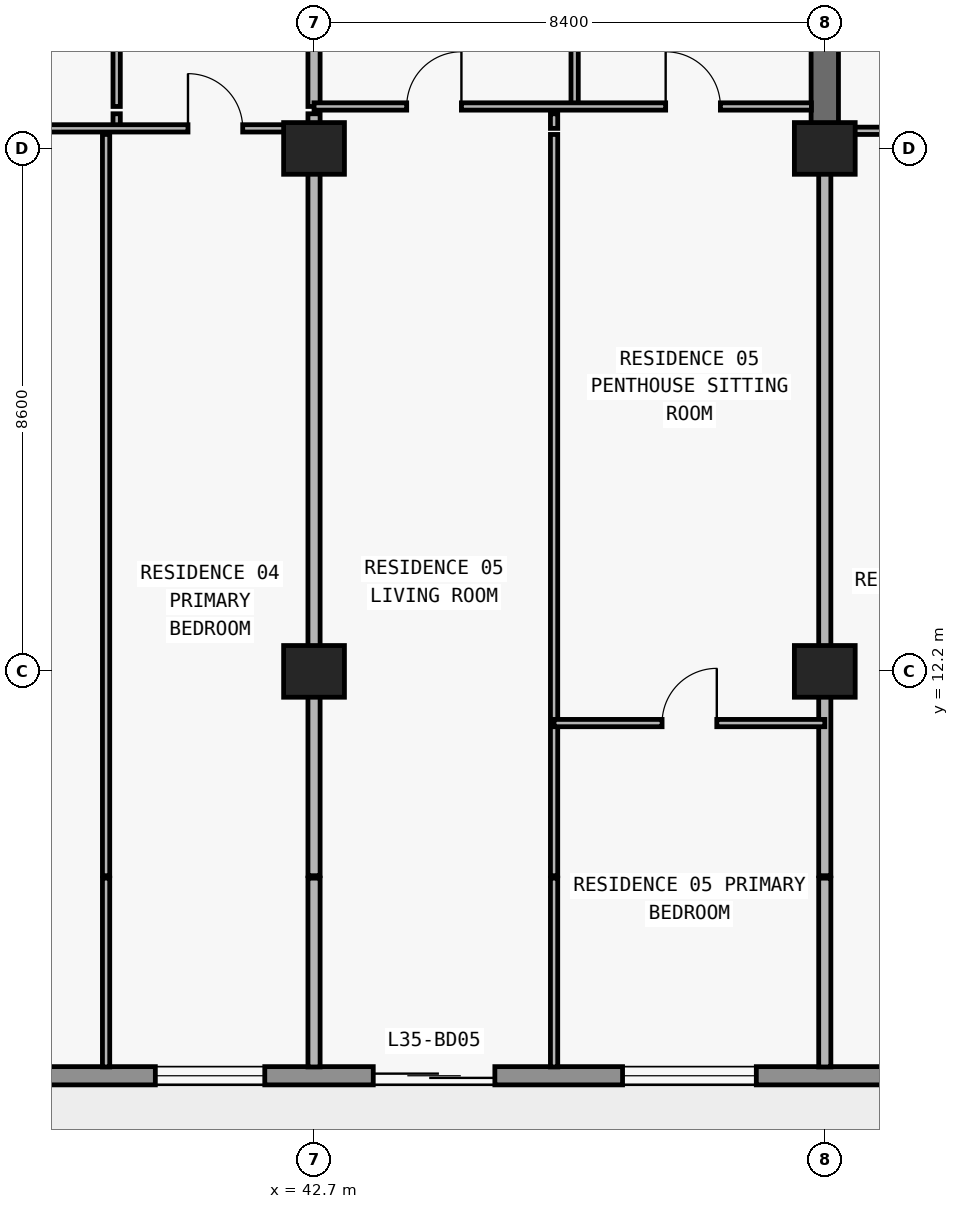
"""IFC4 building model, lengths in metres.
Left out: names, types, materials, properties, quantities, classifications, styles, units other than length and angle.
Written with IfcOpenShell. Run it as: python <this file> out.ifc"""

import sys

from ifc_helpers import new_model, si_unit, direction, frame, frame_2d, origin, origin_2d, place, context, subcontext, project, spatial, rectangle, extrude, element, fill, save


model = new_model("IFC4")
c1 = context("Model", 3, precision=1e-05, world=origin(), true_north=direction((0.0, 1.0)))
c2 = subcontext(c1, "Body", "Model", "MODEL_VIEW")
j1 = project(units=[si_unit("LENGTHUNIT", "METRE"), si_unit("PLANEANGLEUNIT", "RADIAN")], contexts=[c1])
p1 = place(None, origin())
s1 = spatial("IfcSite", under=j1, at=p1, CompositionType="ELEMENT")
p2 = place(p1, origin())
s2 = spatial("IfcBuilding", under=s1, at=p2, CompositionType="ELEMENT")
p3 = place(p2, frame((0.0, 0.0, 129.0)))
s3 = spatial("IfcBuildingStorey", under=s2, at=p3, CompositionType="ELEMENT", Elevation=129.0)
for number, where, z_axis, x_axis in (
    (1, (42.7, 12.2, 0.0), (0.0, 0.0, 1.0), (1.0, 0.0, 0.0)),
    (2, (51.1, 12.2, 0.0), (0.0, 0.0, 1.0), (1.0, 0.0, 0.0)),
    (3, (42.7, 20.8, 0.0), (0.0, 0.0, 1.0), (1.0, 0.0, 0.0)),
    (4, (51.1, 20.8, 0.0), (0.0, 0.0, 1.0), (1.0, 0.0, 0.0)),
):
    element("IfcColumn", number, at=place(p3, frame(where, z_axis=z_axis, x_axis=x_axis)), inside=s3, PredefinedType="COLUMN", context=c2, shape_type="SweptSolid", body=[
        extrude(rectangle(XDim=1.0, YDim=0.85, at=origin_2d()), origin(), (0.0, 0.0, 1.0), 3.05),
    ])
p4 = place(p3, frame((51.1, 20.8, 0.0), z_axis=(0.0, 0.0, 1.0), x_axis=(0.0, 1.0, 0.0)))
e5 = element("IfcWall", 5, at=p4, inside=s3, PredefinedType="SHEAR", context=c2, shape_type="SweptSolid", body=[
    extrude(rectangle(XDim=8.6, YDim=0.45, at=frame_2d((4.3, 0.0))), origin(), (0.0, 0.0, 1.0), 3.05),
])
p5 = place(p3, frame((70.1, 5.55, 0.0), z_axis=(0.0, 0.0, 1.0), x_axis=(-1.0, 0.0, 0.0)))
e6 = element("IfcWall", 6, at=p5, inside=s3, PredefinedType="STANDARD", context=c2, shape_type="SweptSolid", body=[
    extrude(rectangle(XDim=62.4, YDim=0.3, at=frame_2d((31.2, 0.0))), origin(), (0.0, 0.0, 1.0), 3.05),
])
p6 = place(p5, frame((57.226, 0.0, 0.0)))
e7 = element("IfcOpeningElement", 7, at=p6, cuts=e6, PredefinedType="OPENING", context=c2, shape_type="SweptSolid", body=[
    extrude(rectangle(XDim=2.0, YDim=2.3, at=frame_2d((1.0, 1.15))), frame((0.0, 0.16, 0.0), z_axis=(0.0, -1.0, 0.0), x_axis=(1.0, 0.0, 0.0)), (0.0, 0.0, 1.0), 0.32),
])
p7 = place(p5, frame((52.926, 0.0, 0.85)))
e8 = element("IfcOpeningElement", 8, at=p7, cuts=e6, PredefinedType="OPENING", context=c2, shape_type="SweptSolid", body=[
    extrude(rectangle(XDim=2.2, YDim=1.55, at=frame_2d((1.1, 0.775))), frame((0.0, 0.16, 0.0), z_axis=(0.0, -1.0, 0.0), x_axis=(1.0, 0.0, 0.0)), (0.0, 0.0, 1.0), 0.32),
])
p8 = place(p5, frame((48.49, 0.0, 0.0)))
e9 = element("IfcOpeningElement", 9, at=p8, cuts=e6, PredefinedType="OPENING", context=c2, shape_type="SweptSolid", body=[
    extrude(rectangle(XDim=2.0, YDim=2.3, at=frame_2d((1.0, 1.15))), frame((0.0, 0.16, 0.0), z_axis=(0.0, -1.0, 0.0), x_axis=(1.0, 0.0, 0.0)), (0.0, 0.0, 1.0), 0.32),
])
p9 = place(p5, frame((44.39, 0.0, 0.85)))
e10 = element("IfcOpeningElement", 10, at=p9, cuts=e6, PredefinedType="OPENING", context=c2, shape_type="SweptSolid", body=[
    extrude(rectangle(XDim=1.8, YDim=1.55, at=frame_2d((0.9, 0.775))), frame((0.0, 0.16, 0.0), z_axis=(0.0, -1.0, 0.0), x_axis=(1.0, 0.0, 0.0)), (0.0, 0.0, 1.0), 0.32),
])
p10 = place(p5, frame((40.426, 0.0, 0.0)))
e11 = element("IfcOpeningElement", 11, at=p10, cuts=e6, PredefinedType="OPENING", context=c2, shape_type="SweptSolid", body=[
    extrude(rectangle(XDim=2.0, YDim=2.3, at=frame_2d((1.0, 1.15))), frame((0.0, 0.16, 0.0), z_axis=(0.0, -1.0, 0.0), x_axis=(1.0, 0.0, 0.0)), (0.0, 0.0, 1.0), 0.32),
])
p11 = place(p5, frame((36.126, 0.0, 0.85)))
e12 = element("IfcOpeningElement", 12, at=p11, cuts=e6, PredefinedType="OPENING", context=c2, shape_type="SweptSolid", body=[
    extrude(rectangle(XDim=2.2, YDim=1.55, at=frame_2d((1.1, 0.775))), frame((0.0, 0.16, 0.0), z_axis=(0.0, -1.0, 0.0), x_axis=(1.0, 0.0, 0.0)), (0.0, 0.0, 1.0), 0.32),
])
p12 = place(p5, frame((31.91, 0.0, 0.0)))
e13 = element("IfcOpeningElement", 13, at=p12, cuts=e6, PredefinedType="OPENING", context=c2, shape_type="SweptSolid", body=[
    extrude(rectangle(XDim=2.0, YDim=2.3, at=frame_2d((1.0, 1.15))), frame((0.0, 0.16, 0.0), z_axis=(0.0, -1.0, 0.0), x_axis=(1.0, 0.0, 0.0)), (0.0, 0.0, 1.0), 0.32),
])
p13 = place(p5, frame((28.21, 0.0, 0.85)))
e14 = element("IfcOpeningElement", 14, at=p13, cuts=e6, PredefinedType="OPENING", context=c2, shape_type="SweptSolid", body=[
    extrude(rectangle(XDim=1.8, YDim=1.55, at=frame_2d((0.9, 0.775))), frame((0.0, 0.16, 0.0), z_axis=(0.0, -1.0, 0.0), x_axis=(1.0, 0.0, 0.0)), (0.0, 0.0, 1.0), 0.32),
])
p14 = place(p5, frame((24.426, 0.0, 0.0)))
e15 = element("IfcOpeningElement", 15, at=p14, cuts=e6, PredefinedType="OPENING", context=c2, shape_type="SweptSolid", body=[
    extrude(rectangle(XDim=2.0, YDim=2.3, at=frame_2d((1.0, 1.15))), frame((0.0, 0.16, 0.0), z_axis=(0.0, -1.0, 0.0), x_axis=(1.0, 0.0, 0.0)), (0.0, 0.0, 1.0), 0.32),
])
p15 = place(p5, frame((20.126, 0.0, 0.85)))
e16 = element("IfcOpeningElement", 16, at=p15, cuts=e6, PredefinedType="OPENING", context=c2, shape_type="SweptSolid", body=[
    extrude(rectangle(XDim=2.2, YDim=1.55, at=frame_2d((1.1, 0.775))), frame((0.0, 0.16, 0.0), z_axis=(0.0, -1.0, 0.0), x_axis=(1.0, 0.0, 0.0)), (0.0, 0.0, 1.0), 0.32),
])
p16 = place(p5, frame((15.69, 0.0, 0.0)))
e17 = element("IfcOpeningElement", 17, at=p16, cuts=e6, PredefinedType="OPENING", context=c2, shape_type="SweptSolid", body=[
    extrude(rectangle(XDim=2.0, YDim=2.3, at=frame_2d((1.0, 1.15))), frame((0.0, 0.16, 0.0), z_axis=(0.0, -1.0, 0.0), x_axis=(1.0, 0.0, 0.0)), (0.0, 0.0, 1.0), 0.32),
])
p17 = place(p5, frame((11.59, 0.0, 0.85)))
e18 = element("IfcOpeningElement", 18, at=p17, cuts=e6, PredefinedType="OPENING", context=c2, shape_type="SweptSolid", body=[
    extrude(rectangle(XDim=1.8, YDim=1.55, at=frame_2d((0.9, 0.775))), frame((0.0, 0.16, 0.0), z_axis=(0.0, -1.0, 0.0), x_axis=(1.0, 0.0, 0.0)), (0.0, 0.0, 1.0), 0.32),
])
p18 = place(p5, frame((7.626, 0.0, 0.0)))
e19 = element("IfcOpeningElement", 19, at=p18, cuts=e6, PredefinedType="OPENING", context=c2, shape_type="SweptSolid", body=[
    extrude(rectangle(XDim=2.0, YDim=2.3, at=frame_2d((1.0, 1.15))), frame((0.0, 0.16, 0.0), z_axis=(0.0, -1.0, 0.0), x_axis=(1.0, 0.0, 0.0)), (0.0, 0.0, 1.0), 0.32),
])
p19 = place(p5, frame((3.326, 0.0, 0.85)))
e20 = element("IfcOpeningElement", 20, at=p19, cuts=e6, PredefinedType="OPENING", context=c2, shape_type="SweptSolid", body=[
    extrude(rectangle(XDim=2.2, YDim=1.55, at=frame_2d((1.1, 0.775))), frame((0.0, 0.16, 0.0), z_axis=(0.0, -1.0, 0.0), x_axis=(1.0, 0.0, 0.0)), (0.0, 0.0, 1.0), 0.32),
])
p20 = place(p3, frame((39.28, 5.695, 0.0), z_axis=(0.0, 0.0, 1.0), x_axis=(0.0, 1.0, 0.0)))
e21 = element("IfcWall", 21, at=p20, inside=s3, PredefinedType="PARTITIONING", context=c2, shape_type="SweptSolid", body=[
    extrude(rectangle(XDim=3.105, YDim=0.12, at=frame_2d((1.552, 0.0))), origin(), (0.0, 0.0, 1.0), 3.05),
])
p21 = place(p3, frame((39.28, 8.84, 0.0), z_axis=(0.0, 0.0, 1.0), x_axis=(0.0, 1.0, 0.0)))
e22 = element("IfcWall", 22, at=p21, inside=s3, PredefinedType="PARTITIONING", context=c2, shape_type="SweptSolid", body=[
    extrude(rectangle(XDim=12.19, YDim=0.12, at=frame_2d((6.095, 0.0))), origin(), (0.0, 0.0, 1.0), 3.05),
])
p22 = place(p3, frame((39.454, 21.13, 0.0), z_axis=(0.0, 0.0, 1.0), x_axis=(0.0, 1.0, 0.0)))
e23 = element("IfcWall", 23, at=p22, inside=s3, PredefinedType="PARTITIONING", context=c2, shape_type="SweptSolid", body=[
    extrude(rectangle(XDim=0.24, YDim=0.12, at=frame_2d((0.12, 0.0))), origin(), (0.0, 0.0, 1.0), 3.05),
])
p23 = place(p3, frame((39.454, 21.49, 0.0), z_axis=(0.0, 0.0, 1.0), x_axis=(0.0, 1.0, 0.0)))
e24 = element("IfcWall", 24, at=p23, inside=s3, PredefinedType="PARTITIONING", context=c2, shape_type="SweptSolid", body=[
    extrude(rectangle(XDim=4.69, YDim=0.12, at=frame_2d((2.345, 0.0))), origin(), (0.0, 0.0, 1.0), 3.05),
])
p24 = place(p23, frame((1.895, 0.0, 0.0)))
e25 = element("IfcOpeningElement", 25, at=p24, cuts=e24, PredefinedType="OPENING", context=c2, shape_type="SweptSolid", body=[
    extrude(rectangle(XDim=0.9, YDim=2.15, at=frame_2d((0.45, 1.075))), frame((0.0, 0.07, 0.0), z_axis=(0.0, -1.0, 0.0), x_axis=(1.0, 0.0, 0.0)), (0.0, 0.0, 1.0), 0.14),
])
p25 = place(p3, frame((42.7, 5.695, 0.0), z_axis=(0.0, 0.0, 1.0), x_axis=(0.0, 1.0, 0.0)))
e26 = element("IfcWall", 26, at=p25, inside=s3, PredefinedType="PARTITIONING", context=c2, shape_type="SweptSolid", body=[
    extrude(rectangle(XDim=3.105, YDim=0.2, at=frame_2d((1.552, 0.0))), origin(), (0.0, 0.0, 1.0), 3.05),
])
p26 = place(p3, frame((42.7, 8.84, 0.0), z_axis=(0.0, 0.0, 1.0), x_axis=(0.0, 1.0, 0.0)))
e27 = element("IfcWall", 27, at=p26, inside=s3, PredefinedType="PARTITIONING", context=c2, shape_type="SweptSolid", body=[
    extrude(rectangle(XDim=12.19, YDim=0.2, at=frame_2d((6.095, 0.0))), origin(), (0.0, 0.0, 1.0), 2.174),
])
p27 = place(p3, frame((42.7, 21.13, 0.0), z_axis=(0.0, 0.0, 1.0), x_axis=(0.0, 1.0, 0.0)))
e28 = element("IfcWall", 28, at=p27, inside=s3, PredefinedType="PARTITIONING", context=c2, shape_type="SweptSolid", body=[
    extrude(rectangle(XDim=0.24, YDim=0.2, at=frame_2d((0.12, 0.0))), origin(), (0.0, 0.0, 1.0), 2.174),
])
p28 = place(p3, frame((42.7, 21.49, 0.0), z_axis=(0.0, 0.0, 1.0), x_axis=(0.0, 1.0, 0.0)))
e29 = element("IfcWall", 29, at=p28, inside=s3, PredefinedType="PARTITIONING", context=c2, shape_type="SweptSolid", body=[
    extrude(rectangle(XDim=4.69, YDim=0.2, at=frame_2d((2.345, 0.0))), origin(), (0.0, 0.0, 1.0), 2.174),
])
p29 = place(p3, frame((46.648, 5.695, 0.0), z_axis=(0.0, 0.0, 1.0), x_axis=(0.0, 1.0, 0.0)))
e30 = element("IfcWall", 30, at=p29, inside=s3, PredefinedType="PARTITIONING", context=c2, shape_type="SweptSolid", body=[
    extrude(rectangle(XDim=3.105, YDim=0.12, at=frame_2d((1.552, 0.0))), origin(), (0.0, 0.0, 1.0), 3.05),
])
p30 = place(p3, frame((46.648, 8.84, 0.0), z_axis=(0.0, 0.0, 1.0), x_axis=(0.0, 1.0, 0.0)))
e31 = element("IfcWall", 31, at=p30, inside=s3, PredefinedType="PARTITIONING", context=c2, shape_type="SweptSolid", body=[
    extrude(rectangle(XDim=12.19, YDim=0.12, at=frame_2d((6.095, 0.0))), origin(), (0.0, 0.0, 1.0), 3.05),
])
p31 = place(p3, frame((46.648, 21.13, 0.0), z_axis=(0.0, 0.0, 1.0), x_axis=(0.0, 1.0, 0.0)))
e32 = element("IfcWall", 32, at=p31, inside=s3, PredefinedType="PARTITIONING", context=c2, shape_type="SweptSolid", body=[
    extrude(rectangle(XDim=0.24, YDim=0.12, at=frame_2d((0.12, 0.0))), origin(), (0.0, 0.0, 1.0), 3.05),
])
p32 = place(p3, frame((46.986, 21.49, 0.0), z_axis=(0.0, 0.0, 1.0), x_axis=(0.0, 1.0, 0.0)))
e33 = element("IfcWall", 33, at=p32, inside=s3, PredefinedType="PARTITIONING", context=c2, shape_type="SweptSolid", body=[
    extrude(rectangle(XDim=4.69, YDim=0.12, at=frame_2d((2.345, 0.0))), origin(), (0.0, 0.0, 1.0), 3.05),
])
p33 = place(p32, frame((1.895, 0.0, 0.0)))
e34 = element("IfcOpeningElement", 34, at=p33, cuts=e33, PredefinedType="OPENING", context=c2, shape_type="SweptSolid", body=[
    extrude(rectangle(XDim=0.9, YDim=2.15, at=frame_2d((0.45, 1.075))), frame((0.0, 0.07, 0.0), z_axis=(0.0, -1.0, 0.0), x_axis=(1.0, 0.0, 0.0)), (0.0, 0.0, 1.0), 0.14),
])
p34 = place(p3, frame((51.1, 5.695, 0.0), z_axis=(0.0, 0.0, 1.0), x_axis=(0.0, 1.0, 0.0)))
e35 = element("IfcWall", 35, at=p34, inside=s3, PredefinedType="PARTITIONING", context=c2, shape_type="SweptSolid", body=[
    extrude(rectangle(XDim=3.105, YDim=0.2, at=frame_2d((1.552, 0.0))), origin(), (0.0, 0.0, 1.0), 3.05),
])
p35 = place(p3, frame((51.1, 8.84, 0.0), z_axis=(0.0, 0.0, 1.0), x_axis=(0.0, 1.0, 0.0)))
e36 = element("IfcWall", 36, at=p35, inside=s3, PredefinedType="PARTITIONING", context=c2, shape_type="SweptSolid", body=[
    extrude(rectangle(XDim=11.955, YDim=0.2, at=frame_2d((5.978, 0.0))), origin(), (0.0, 0.0, 1.0), 2.174),
])
p36 = place(p3, frame((46.648, 11.35, 0.0), z_axis=(0.0, 0.0, 1.0), x_axis=(1.0, 0.0, 0.0)))
e37 = element("IfcWall", 37, at=p36, inside=s3, PredefinedType="PARTITIONING", context=c2, shape_type="SweptSolid", body=[
    extrude(rectangle(XDim=4.452, YDim=0.12, at=frame_2d((2.226, 0.0))), origin(), (0.0, 0.0, 1.0), 3.05),
])
p37 = place(p36, frame((1.776, 0.0, 0.0)))
e38 = element("IfcOpeningElement", 38, at=p37, cuts=e37, PredefinedType="OPENING", context=c2, shape_type="SweptSolid", body=[
    extrude(rectangle(XDim=0.9, YDim=2.15, at=frame_2d((0.45, 1.075))), frame((0.0, 0.07, 0.0), z_axis=(0.0, -1.0, 0.0), x_axis=(1.0, 0.0, 0.0)), (0.0, 0.0, 1.0), 0.14),
])
p38 = place(p3, frame((51.32, 21.09, 0.0), z_axis=(0.0, 0.0, 1.0), x_axis=(1.0, 0.0, 0.0)))
e39 = element("IfcWall", 39, at=p38, inside=s3, PredefinedType="PARTITIONING", context=c2, shape_type="SweptSolid", body=[
    extrude(rectangle(XDim=8.18, YDim=0.12, at=frame_2d((4.09, 0.0))), origin(), (0.0, 0.0, 1.0), 2.174),
])
p39 = place(p38, frame((1.708, 0.0, 0.0)))
e40 = element("IfcOpeningElement", 40, at=p39, cuts=e39, PredefinedType="OPENING", context=c2, shape_type="SweptSolid", body=[
    extrude(rectangle(XDim=0.9, YDim=2.124, at=frame_2d((0.45, 1.062))), frame((0.0, 0.07, 0.0), z_axis=(0.0, -1.0, 0.0), x_axis=(1.0, 0.0, 0.0)), (0.0, 0.0, 1.0), 0.14),
])
p40 = place(p38, frame((5.84, 0.0, 0.0)))
e41 = element("IfcOpeningElement", 41, at=p40, cuts=e39, PredefinedType="OPENING", context=c2, shape_type="SweptSolid", body=[
    extrude(rectangle(XDim=0.9, YDim=2.124, at=frame_2d((0.45, 1.062))), frame((0.0, 0.07, 0.0), z_axis=(0.0, -1.0, 0.0), x_axis=(1.0, 0.0, 0.0)), (0.0, 0.0, 1.0), 0.14),
])
p41 = place(p3, frame((35.1, 21.13, 0.0), z_axis=(0.0, 0.0, 1.0), x_axis=(1.0, 0.0, 0.0)))
e42 = element("IfcWall", 42, at=p41, inside=s3, PredefinedType="PARTITIONING", context=c2, shape_type="SweptSolid", body=[
    extrude(rectangle(XDim=7.6, YDim=0.12, at=frame_2d((3.8, 0.0))), origin(), (0.0, 0.0, 1.0), 2.174),
])
p42 = place(p41, frame((1.64, 0.0, 0.0)))
e43 = element("IfcOpeningElement", 43, at=p42, cuts=e42, PredefinedType="OPENING", context=c2, shape_type="SweptSolid", body=[
    extrude(rectangle(XDim=0.9, YDim=2.124, at=frame_2d((0.45, 1.062))), frame((0.0, 0.07, 0.0), z_axis=(0.0, -1.0, 0.0), x_axis=(1.0, 0.0, 0.0)), (0.0, 0.0, 1.0), 0.14),
])
p43 = place(p41, frame((5.527, 0.0, 0.0)))
e44 = element("IfcOpeningElement", 44, at=p43, cuts=e42, PredefinedType="OPENING", context=c2, shape_type="SweptSolid", body=[
    extrude(rectangle(XDim=0.9, YDim=2.124, at=frame_2d((0.45, 1.062))), frame((0.0, 0.07, 0.0), z_axis=(0.0, -1.0, 0.0), x_axis=(1.0, 0.0, 0.0)), (0.0, 0.0, 1.0), 0.14),
])
p44 = place(p3, frame((42.7, 21.49, 0.0), z_axis=(0.0, 0.0, 1.0), x_axis=(1.0, 0.0, 0.0)))
e45 = element("IfcWall", 45, at=p44, inside=s3, PredefinedType="PARTITIONING", context=c2, shape_type="SweptSolid", body=[
    extrude(rectangle(XDim=8.18, YDim=0.12, at=frame_2d((4.09, 0.0))), origin(), (0.0, 0.0, 1.0), 3.05),
])
p45 = place(p44, frame((1.524, 0.0, 0.0)))
e46 = element("IfcOpeningElement", 46, at=p45, cuts=e45, PredefinedType="OPENING", context=c2, shape_type="SweptSolid", body=[
    extrude(rectangle(XDim=0.9, YDim=2.15, at=frame_2d((0.45, 1.075))), frame((0.0, 0.07, 0.0), z_axis=(0.0, -1.0, 0.0), x_axis=(1.0, 0.0, 0.0)), (0.0, 0.0, 1.0), 0.14),
])
p46 = place(p44, frame((5.783, 0.0, 0.0)))
e47 = element("IfcOpeningElement", 47, at=p46, cuts=e45, PredefinedType="OPENING", context=c2, shape_type="SweptSolid", body=[
    extrude(rectangle(XDim=0.9, YDim=2.15, at=frame_2d((0.45, 1.075))), frame((0.0, 0.07, 0.0), z_axis=(0.0, -1.0, 0.0), x_axis=(1.0, 0.0, 0.0)), (0.0, 0.0, 1.0), 0.14),
])
p47 = place(p13, origin())
e48 = element("IfcWindow", 48, at=p47, inside=s3, PartitioningType="SINGLE_PANEL", PredefinedType="WINDOW", context=c2, shape_type="SweptSolid", body=[
    extrude(rectangle(XDim=1.8, YDim=1.55, at=frame_2d((0.9, 0.775))), frame((0.0, 0.03, 0.0), z_axis=(0.0, -1.0, 0.0), x_axis=(1.0, 0.0, 0.0)), (0.0, 0.0, 1.0), 0.06),
])
fill(e14, e48)
p48 = place(p14, origin())
e49 = element("IfcDoor", 49, at=p48, inside=s3, OperationType="DOUBLE_DOOR_SLIDING", PredefinedType="DOOR", context=c2, shape_type="SweptSolid", body=[
    extrude(rectangle(XDim=2.0, YDim=2.3, at=frame_2d((1.0, 1.15))), frame((0.0, 0.025, 0.0), z_axis=(0.0, -1.0, 0.0), x_axis=(1.0, 0.0, 0.0)), (0.0, 0.0, 1.0), 0.05),
])
fill(e15, e49)
p49 = place(p15, origin())
e50 = element("IfcWindow", 50, at=p49, inside=s3, PartitioningType="SINGLE_PANEL", PredefinedType="WINDOW", context=c2, shape_type="SweptSolid", body=[
    extrude(rectangle(XDim=2.2, YDim=1.55, at=frame_2d((1.1, 0.775))), frame((0.0, 0.03, 0.0), z_axis=(0.0, -1.0, 0.0), x_axis=(1.0, 0.0, 0.0)), (0.0, 0.0, 1.0), 0.06),
])
fill(e16, e50)
p50 = place(p43, origin())
e51 = element("IfcDoor", 51, at=p50, inside=s3, OperationType="SINGLE_SWING_LEFT", PredefinedType="DOOR", context=c2, shape_type="SweptSolid", body=[
    extrude(rectangle(XDim=0.9, YDim=2.124, at=frame_2d((0.45, 1.062))), frame((0.0, 0.025, 0.0), z_axis=(0.0, -1.0, 0.0), x_axis=(1.0, 0.0, 0.0)), (0.0, 0.0, 1.0), 0.05),
])
fill(e44, e51)
p51 = place(p45, origin())
e52 = element("IfcDoor", 52, at=p51, inside=s3, OperationType="SINGLE_SWING_RIGHT", PredefinedType="DOOR", context=c2, shape_type="SweptSolid", body=[
    extrude(rectangle(XDim=0.9, YDim=2.15, at=frame_2d((0.45, 1.075))), frame((0.0, 0.025, 0.0), z_axis=(0.0, -1.0, 0.0), x_axis=(1.0, 0.0, 0.0)), (0.0, 0.0, 1.0), 0.05),
])
fill(e46, e52)
p52 = place(p46, origin())
e53 = element("IfcDoor", 53, at=p52, inside=s3, OperationType="SINGLE_SWING_LEFT", PredefinedType="DOOR", context=c2, shape_type="SweptSolid", body=[
    extrude(rectangle(XDim=0.9, YDim=2.15, at=frame_2d((0.45, 1.075))), frame((0.0, 0.025, 0.0), z_axis=(0.0, -1.0, 0.0), x_axis=(1.0, 0.0, 0.0)), (0.0, 0.0, 1.0), 0.05),
])
fill(e47, e53)
p53 = place(p37, origin())
e54 = element("IfcDoor", 54, at=p53, inside=s3, OperationType="SINGLE_SWING_RIGHT", PredefinedType="DOOR", context=c2, shape_type="SweptSolid", body=[
    extrude(rectangle(XDim=0.9, YDim=2.15, at=frame_2d((0.45, 1.075))), frame((0.0, 0.025, 0.0), z_axis=(0.0, -1.0, 0.0), x_axis=(1.0, 0.0, 0.0)), (0.0, 0.0, 1.0), 0.05),
])
fill(e38, e54)
save(model, sys.argv[1])
